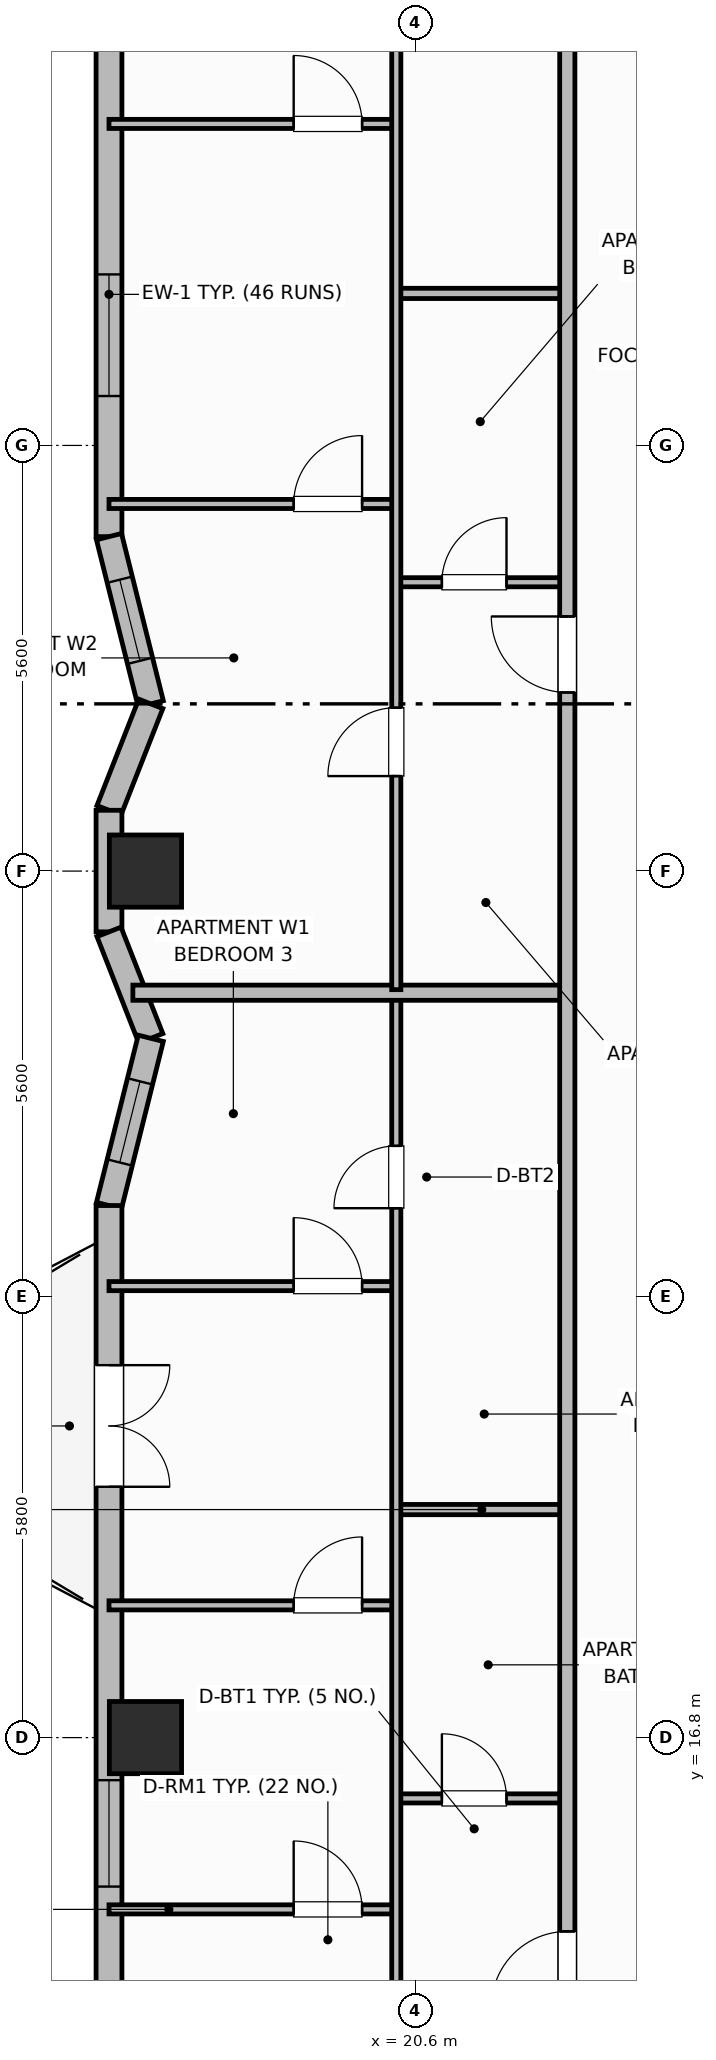
"""IFC4 building model, lengths in metres.
Left out: names, types, materials, properties, quantities, classifications, styles, units other than length and angle.
Written with IfcOpenShell. Run it as: python <this file> out.ifc"""

import sys

from ifc_helpers import new_model, si_unit, direction, frame, frame_2d, origin, origin_2d, place, context, subcontext, project, spatial, rectangle, extrude, element, fill, save


model = new_model("IFC4")
c1 = context("Model", 3, precision=1e-05, world=origin(), true_north=direction((0.0, 1.0)))
c2 = subcontext(c1, "Body", "Model", "MODEL_VIEW")
j1 = project(units=[si_unit("LENGTHUNIT", "METRE"), si_unit("PLANEANGLEUNIT", "RADIAN")], contexts=[c1])
p1 = place(None, origin())
s1 = spatial("IfcSite", under=j1, at=p1, CompositionType="ELEMENT")
p2 = place(p1, origin())
s2 = spatial("IfcBuilding", under=s1, at=p2, CompositionType="ELEMENT")
p3 = place(p2, frame((0.0, 0.0, 151.5)))
s3 = spatial("IfcBuildingStorey", under=s2, at=p3, CompositionType="ELEMENT", Elevation=151.5)
for number, where, z_axis, x_axis in (
    (1, (17.05, 16.8, 0.0), (0.0, 0.0, 1.0), (1.0, 0.0, 0.0)),
    (2, (17.05, 28.2, 0.0), (0.0, 0.0, 1.0), (1.0, 0.0, 0.0)),
):
    element("IfcColumn", number, at=place(p3, frame(where, z_axis=z_axis, x_axis=x_axis)), inside=s3, PredefinedType="COLUMN", context=c2, shape_type="SweptSolid", body=[
        extrude(rectangle(XDim=0.95, YDim=0.95, at=origin_2d()), origin(), (0.0, 0.0, 1.0), 3.7),
    ])
p4 = place(p3, frame((16.57, 45.9, 0.0), z_axis=(0.0, 0.0, 1.0), x_axis=(0.0, -1.0, 0.0)))
e3 = element("IfcWall", 3, at=p4, inside=s3, PredefinedType="SOLIDWALL", context=c2, shape_type="SweptSolid", body=[
    extrude(rectangle(XDim=13.3, YDim=0.34, at=frame_2d((6.65, 0.0))), origin(), (0.0, 0.0, 1.0), 2.72),
])
p5 = place(p4, frame((1.85, 0.0, 0.7)))
e4 = element("IfcOpeningElement", 4, at=p5, cuts=e3, PredefinedType="OPENING", context=c2, shape_type="SweptSolid", body=[
    extrude(rectangle(XDim=1.6, YDim=1.9, at=frame_2d((0.8, 0.95))), frame((0.0, 0.18, 0.0), z_axis=(0.0, -1.0, 0.0), x_axis=(1.0, 0.0, 0.0)), (0.0, 0.0, 1.0), 0.36),
])
p6 = place(p4, frame((9.85, 0.0, 0.7)))
e5 = element("IfcOpeningElement", 5, at=p6, cuts=e3, PredefinedType="OPENING", context=c2, shape_type="SweptSolid", body=[
    extrude(rectangle(XDim=1.6, YDim=1.9, at=frame_2d((0.8, 0.95))), frame((0.0, 0.18, 0.0), z_axis=(0.0, -1.0, 0.0), x_axis=(1.0, 0.0, 0.0)), (0.0, 0.0, 1.0), 0.36),
])
p7 = place(p3, frame((16.57, 32.6, 0.0), z_axis=(0.0, 0.0, 1.0), x_axis=(0.242535625036, -0.970142500145, 0.0)))
e6 = element("IfcWall", 6, at=p7, inside=s3, PredefinedType="SOLIDWALL", context=c2, shape_type="SweptSolid", body=[
    extrude(rectangle(XDim=2.268, YDim=0.34, at=frame_2d((1.134, 0.0))), origin(), (0.0, 0.0, 1.0), 2.72),
])
p8 = place(p7, frame((0.584, 0.0, 0.91)))
e7 = element("IfcOpeningElement", 7, at=p8, cuts=e6, PredefinedType="OPENING", context=c2, shape_type="SweptSolid", body=[
    extrude(rectangle(XDim=1.1, YDim=1.65, at=frame_2d((0.55, 0.825))), frame((0.0, 0.18, 0.0), z_axis=(0.0, -1.0, 0.0), x_axis=(1.0, 0.0, 0.0)), (0.0, 0.0, 1.0), 0.36),
])
p9 = place(p3, frame((17.12, 30.4, 0.0), z_axis=(0.0, 0.0, 1.0), x_axis=(-0.365702591843, -0.930731762818, 0.0)))
e8 = element("IfcWall", 8, at=p9, inside=s3, PredefinedType="SOLIDWALL", context=c2, shape_type="SweptSolid", body=[
    extrude(rectangle(XDim=1.504, YDim=0.34, at=frame_2d((0.752, 0.0))), origin(), (0.0, 0.0, 1.0), 2.72),
])
p10 = place(p3, frame((16.57, 29.0, 0.0), z_axis=(0.0, 0.0, 1.0), x_axis=(0.0, -1.0, 0.0)))
e9 = element("IfcWall", 9, at=p10, inside=s3, PredefinedType="SOLIDWALL", context=c2, shape_type="SweptSolid", body=[
    extrude(rectangle(XDim=1.6, YDim=0.34, at=frame_2d((0.8, 0.0))), origin(), (0.0, 0.0, 1.0), 2.72),
])
p11 = place(p3, frame((16.57, 27.4, 0.0), z_axis=(0.0, 0.0, 1.0), x_axis=(0.365702591843, -0.930731762818, 0.0)))
e10 = element("IfcWall", 10, at=p11, inside=s3, PredefinedType="SOLIDWALL", context=c2, shape_type="SweptSolid", body=[
    extrude(rectangle(XDim=1.504, YDim=0.34, at=frame_2d((0.752, 0.0))), origin(), (0.0, 0.0, 1.0), 2.72),
])
p12 = place(p3, frame((17.12, 26.0, 0.0), z_axis=(0.0, 0.0, 1.0), x_axis=(-0.242560957029, -0.970136166796, 0.0)))
e11 = element("IfcWall", 11, at=p12, inside=s3, PredefinedType="SOLIDWALL", context=c2, shape_type="SweptSolid", body=[
    extrude(rectangle(XDim=2.268, YDim=0.34, at=frame_2d((1.134, 0.0))), origin(), (0.0, 0.0, 1.0), 2.72),
])
p13 = place(p12, frame((0.584, 0.0, 0.91)))
e12 = element("IfcOpeningElement", 12, at=p13, cuts=e11, PredefinedType="OPENING", context=c2, shape_type="SweptSolid", body=[
    extrude(rectangle(XDim=1.1, YDim=1.65, at=frame_2d((0.55, 0.825))), frame((0.0, 0.18, 0.0), z_axis=(0.0, -1.0, 0.0), x_axis=(1.0, 0.0, 0.0)), (0.0, 0.0, 1.0), 0.36),
])
p14 = place(p3, frame((16.57, 23.8, 0.0), z_axis=(0.0, 0.0, 1.0), x_axis=(0.0, -1.0, 0.0)))
e13 = element("IfcWall", 13, at=p14, inside=s3, PredefinedType="SOLIDWALL", context=c2, shape_type="SweptSolid", body=[
    extrude(rectangle(XDim=13.3, YDim=0.34, at=frame_2d((6.65, 0.0))), origin(), (0.0, 0.0, 1.0), 2.72),
])
p15 = place(p14, frame((2.1, 0.0, 0.0)))
e14 = element("IfcOpeningElement", 14, at=p15, cuts=e13, PredefinedType="OPENING", context=c2, shape_type="SweptSolid", body=[
    extrude(rectangle(XDim=1.6, YDim=2.1, at=frame_2d((0.8, 1.05))), frame((0.0, 0.18, 0.0), z_axis=(0.0, -1.0, 0.0), x_axis=(1.0, 0.0, 0.0)), (0.0, 0.0, 1.0), 0.36),
])
p16 = place(p14, frame((7.56, 0.0, 0.71)))
e15 = element("IfcOpeningElement", 15, at=p16, cuts=e13, PredefinedType="OPENING", context=c2, shape_type="SweptSolid", body=[
    extrude(rectangle(XDim=1.4, YDim=1.85, at=frame_2d((0.7, 0.925))), frame((0.0, 0.18, 0.0), z_axis=(0.0, -1.0, 0.0), x_axis=(1.0, 0.0, 0.0)), (0.0, 0.0, 1.0), 0.36),
])
p17 = place(p14, frame((10.45, 0.0, 0.75)))
e16 = element("IfcOpeningElement", 16, at=p17, cuts=e13, PredefinedType="OPENING", context=c2, shape_type="SweptSolid", body=[
    extrude(rectangle(XDim=1.4, YDim=1.85, at=frame_2d((0.7, 0.925))), frame((0.0, 0.18, 0.0), z_axis=(0.0, -1.0, 0.0), x_axis=(1.0, 0.0, 0.0)), (0.0, 0.0, 1.0), 0.36),
])
p18 = place(p3, frame((20.35, 16.0, 0.0), z_axis=(0.0, 0.0, 1.0), x_axis=(1.0, 0.0, 0.0)))
e17 = element("IfcWall", 17, at=p18, inside=s3, PredefinedType="PARTITIONING", context=c2, shape_type="SweptSolid", body=[
    extrude(rectangle(XDim=2.25, YDim=0.12, at=frame_2d((1.125, 0.0))), origin(), (0.0, 0.0, 1.0), 2.55),
])
p19 = place(p18, frame((0.6, 0.0, 0.0)))
e18 = element("IfcOpeningElement", 18, at=p19, cuts=e17, PredefinedType="OPENING", context=c2, shape_type="SweptSolid", body=[
    extrude(rectangle(XDim=0.85, YDim=2.1, at=frame_2d((0.425, 1.05))), frame((0.0, 0.07, 0.0), z_axis=(0.0, -1.0, 0.0), x_axis=(1.0, 0.0, 0.0)), (0.0, 0.0, 1.0), 0.14),
])
p20 = place(p3, frame((20.35, 19.8, 0.0), z_axis=(0.0, 0.0, 1.0), x_axis=(1.0, 0.0, 0.0)))
e19 = element("IfcWall", 19, at=p20, inside=s3, PredefinedType="PARTITIONING", context=c2, shape_type="SweptSolid", body=[
    extrude(rectangle(XDim=2.25, YDim=0.135, at=frame_2d((1.125, 0.0))), origin(), (0.0, 0.0, 1.0), 2.55),
])
p21 = place(p3, frame((16.57, 14.54, 0.0), z_axis=(0.0, 0.0, 1.0), x_axis=(1.0, 0.0, 0.0)))
e20 = element("IfcWall", 20, at=p21, inside=s3, PredefinedType="PARTITIONING", context=c2, shape_type="SweptSolid", body=[
    extrude(rectangle(XDim=3.78, YDim=0.12, at=frame_2d((1.89, 0.0))), origin(), (0.0, 0.0, 1.0), 2.55),
])
p22 = place(p21, frame((2.43, 0.0, 0.0)))
e21 = element("IfcOpeningElement", 21, at=p22, cuts=e20, PredefinedType="OPENING", context=c2, shape_type="SweptSolid", body=[
    extrude(rectangle(XDim=0.9, YDim=2.1, at=frame_2d((0.45, 1.05))), frame((0.0, 0.07, 0.0), z_axis=(0.0, -1.0, 0.0), x_axis=(1.0, 0.0, 0.0)), (0.0, 0.0, 1.0), 0.14),
])
p23 = place(p3, frame((16.57, 18.54, 0.0), z_axis=(0.0, 0.0, 1.0), x_axis=(1.0, 0.0, 0.0)))
e22 = element("IfcWall", 22, at=p23, inside=s3, PredefinedType="PARTITIONING", context=c2, shape_type="SweptSolid", body=[
    extrude(rectangle(XDim=3.78, YDim=0.12, at=frame_2d((1.89, 0.0))), origin(), (0.0, 0.0, 1.0), 2.55),
])
p24 = place(p23, frame((2.43, 0.0, 0.0)))
e23 = element("IfcOpeningElement", 23, at=p24, cuts=e22, PredefinedType="OPENING", context=c2, shape_type="SweptSolid", body=[
    extrude(rectangle(XDim=0.9, YDim=2.1, at=frame_2d((0.45, 1.05))), frame((0.0, 0.07, 0.0), z_axis=(0.0, -1.0, 0.0), x_axis=(1.0, 0.0, 0.0)), (0.0, 0.0, 1.0), 0.14),
])
p25 = place(p3, frame((16.57, 22.74, 0.0), z_axis=(0.0, 0.0, 1.0), x_axis=(1.0, 0.0, 0.0)))
e24 = element("IfcWall", 24, at=p25, inside=s3, PredefinedType="PARTITIONING", context=c2, shape_type="SweptSolid", body=[
    extrude(rectangle(XDim=3.78, YDim=0.12, at=frame_2d((1.89, 0.0))), origin(), (0.0, 0.0, 1.0), 2.55),
])
p26 = place(p25, frame((2.43, 0.0, 0.0)))
e25 = element("IfcOpeningElement", 25, at=p26, cuts=e24, PredefinedType="OPENING", context=c2, shape_type="SweptSolid", body=[
    extrude(rectangle(XDim=0.9, YDim=2.1, at=frame_2d((0.45, 1.05))), frame((0.0, 0.07, 0.0), z_axis=(0.0, -1.0, 0.0), x_axis=(1.0, 0.0, 0.0)), (0.0, 0.0, 1.0), 0.14),
])
p27 = place(p3, frame((20.35, 10.64, 0.0), z_axis=(0.0, 0.0, 1.0), x_axis=(0.0, 1.0, 0.0)))
e26 = element("IfcWall", 26, at=p27, inside=s3, PredefinedType="PARTITIONING", context=c2, shape_type="SweptSolid", body=[
    extrude(rectangle(XDim=15.92, YDim=0.12, at=frame_2d((7.96, 0.0))), origin(), (0.0, 0.0, 1.0), 2.55),
])
p28 = place(p27, frame((0.41, 0.0, 0.0)))
e27 = element("IfcOpeningElement", 27, at=p28, cuts=e26, PredefinedType="OPENING", context=c2, shape_type="SweptSolid", body=[
    extrude(rectangle(XDim=0.9, YDim=2.1, at=frame_2d((0.45, 1.05))), frame((0.0, 0.07, 0.0), z_axis=(0.0, -1.0, 0.0), x_axis=(1.0, 0.0, 0.0)), (0.0, 0.0, 1.0), 0.14),
])
p29 = place(p27, frame((13.125, 0.0, 0.0)))
e28 = element("IfcOpeningElement", 28, at=p29, cuts=e26, PredefinedType="OPENING", context=c2, shape_type="SweptSolid", body=[
    extrude(rectangle(XDim=0.82, YDim=2.08, at=frame_2d((0.41, 1.04))), frame((0.0, 0.07, 0.0), z_axis=(0.0, -1.0, 0.0), x_axis=(1.0, 0.0, 0.0)), (0.0, 0.0, 1.0), 0.14),
])
p30 = place(p3, frame((16.884, 26.6, 0.0), z_axis=(0.0, 0.0, 1.0), x_axis=(1.0, 0.0, 0.0)))
e29 = element("IfcWall", 29, at=p30, inside=s3, PredefinedType="PARTITIONING", context=c2, shape_type="SweptSolid", body=[
    extrude(rectangle(XDim=5.716, YDim=0.2, at=frame_2d((2.858, 0.0))), origin(), (0.0, 0.0, 1.0), 2.55),
])
p31 = place(p3, frame((20.35, 32.0, 0.0), z_axis=(0.0, 0.0, 1.0), x_axis=(1.0, 0.0, 0.0)))
e30 = element("IfcWall", 30, at=p31, inside=s3, PredefinedType="PARTITIONING", context=c2, shape_type="SweptSolid", body=[
    extrude(rectangle(XDim=2.25, YDim=0.12, at=frame_2d((1.125, 0.0))), origin(), (0.0, 0.0, 1.0), 2.55),
])
p32 = place(p31, frame((0.6, 0.0, 0.0)))
e31 = element("IfcOpeningElement", 31, at=p32, cuts=e30, PredefinedType="OPENING", context=c2, shape_type="SweptSolid", body=[
    extrude(rectangle(XDim=0.85, YDim=2.1, at=frame_2d((0.425, 1.05))), frame((0.0, 0.07, 0.0), z_axis=(0.0, -1.0, 0.0), x_axis=(1.0, 0.0, 0.0)), (0.0, 0.0, 1.0), 0.14),
])
p33 = place(p3, frame((20.35, 35.8, 0.0), z_axis=(0.0, 0.0, 1.0), x_axis=(1.0, 0.0, 0.0)))
e32 = element("IfcWall", 32, at=p33, inside=s3, PredefinedType="PARTITIONING", context=c2, shape_type="SweptSolid", body=[
    extrude(rectangle(XDim=2.25, YDim=0.135, at=frame_2d((1.125, 0.0))), origin(), (0.0, 0.0, 1.0), 2.55),
])
p34 = place(p3, frame((16.57, 33.03, 0.0), z_axis=(0.0, 0.0, 1.0), x_axis=(1.0, 0.0, 0.0)))
e33 = element("IfcWall", 33, at=p34, inside=s3, PredefinedType="PARTITIONING", context=c2, shape_type="SweptSolid", body=[
    extrude(rectangle(XDim=3.78, YDim=0.12, at=frame_2d((1.89, 0.0))), origin(), (0.0, 0.0, 1.0), 2.55),
])
p35 = place(p34, frame((2.43, 0.0, 0.0)))
e34 = element("IfcOpeningElement", 34, at=p35, cuts=e33, PredefinedType="OPENING", context=c2, shape_type="SweptSolid", body=[
    extrude(rectangle(XDim=0.9, YDim=2.1, at=frame_2d((0.45, 1.05))), frame((0.0, 0.07, 0.0), z_axis=(0.0, -1.0, 0.0), x_axis=(1.0, 0.0, 0.0)), (0.0, 0.0, 1.0), 0.14),
])
p36 = place(p3, frame((16.57, 38.03, 0.0), z_axis=(0.0, 0.0, 1.0), x_axis=(1.0, 0.0, 0.0)))
e35 = element("IfcWall", 35, at=p36, inside=s3, PredefinedType="PARTITIONING", context=c2, shape_type="SweptSolid", body=[
    extrude(rectangle(XDim=3.78, YDim=0.12, at=frame_2d((1.89, 0.0))), origin(), (0.0, 0.0, 1.0), 2.55),
])
p37 = place(p36, frame((2.43, 0.0, 0.0)))
e36 = element("IfcOpeningElement", 36, at=p37, cuts=e35, PredefinedType="OPENING", context=c2, shape_type="SweptSolid", body=[
    extrude(rectangle(XDim=0.9, YDim=2.1, at=frame_2d((0.45, 1.05))), frame((0.0, 0.07, 0.0), z_axis=(0.0, -1.0, 0.0), x_axis=(1.0, 0.0, 0.0)), (0.0, 0.0, 1.0), 0.14),
])
p38 = place(p3, frame((20.35, 26.64, 0.0), z_axis=(0.0, 0.0, 1.0), x_axis=(0.0, 1.0, 0.0)))
e37 = element("IfcWall", 37, at=p38, inside=s3, PredefinedType="PARTITIONING", context=c2, shape_type="SweptSolid", body=[
    extrude(rectangle(XDim=19.12, YDim=0.12, at=frame_2d((9.56, 0.0))), origin(), (0.0, 0.0, 1.0), 2.55),
])
p39 = place(p38, frame((2.81, 0.0, 0.0)))
e38 = element("IfcOpeningElement", 38, at=p39, cuts=e37, PredefinedType="OPENING", context=c2, shape_type="SweptSolid", body=[
    extrude(rectangle(XDim=0.9, YDim=2.1, at=frame_2d((0.45, 1.05))), frame((0.0, 0.07, 0.0), z_axis=(0.0, -1.0, 0.0), x_axis=(1.0, 0.0, 0.0)), (0.0, 0.0, 1.0), 0.14),
])
p40 = place(p38, frame((15.365, 0.0, 0.0)))
e39 = element("IfcOpeningElement", 39, at=p40, cuts=e37, PredefinedType="OPENING", context=c2, shape_type="SweptSolid", body=[
    extrude(rectangle(XDim=0.82, YDim=2.08, at=frame_2d((0.41, 1.04))), frame((0.0, 0.07, 0.0), z_axis=(0.0, -1.0, 0.0), x_axis=(1.0, 0.0, 0.0)), (0.0, 0.0, 1.0), 0.14),
])
p41 = place(p3, frame((22.6, 10.6, 0.0), z_axis=(0.0, 0.0, 1.0), x_axis=(0.0, 1.0, 0.0)))
e40 = element("IfcWall", 40, at=p41, inside=s3, PredefinedType="PARTITIONING", context=c2, shape_type="SweptSolid", body=[
    extrude(rectangle(XDim=35.2, YDim=0.2, at=frame_2d((17.6, 0.0))), origin(), (0.0, 0.0, 1.0), 2.55),
])
p42 = place(p41, frame((2.65, 0.0, 0.0)))
e41 = element("IfcOpeningElement", 41, at=p42, cuts=e40, PredefinedType="OPENING", context=c2, shape_type="SweptSolid", body=[
    extrude(rectangle(XDim=1.0, YDim=2.15, at=frame_2d((0.5, 1.075))), frame((0.0, 0.11, 0.0), z_axis=(0.0, -1.0, 0.0), x_axis=(1.0, 0.0, 0.0)), (0.0, 0.0, 1.0), 0.22),
])
p43 = place(p41, frame((19.95, 0.0, 0.0)))
e42 = element("IfcOpeningElement", 42, at=p43, cuts=e40, PredefinedType="OPENING", context=c2, shape_type="SweptSolid", body=[
    extrude(rectangle(XDim=1.0, YDim=2.15, at=frame_2d((0.5, 1.075))), frame((0.0, 0.11, 0.0), z_axis=(0.0, -1.0, 0.0), x_axis=(1.0, 0.0, 0.0)), (0.0, 0.0, 1.0), 0.22),
])
p44 = place(p6, origin())
e43 = element("IfcWindow", 43, at=p44, inside=s3, PartitioningType="SINGLE_PANEL", PredefinedType="WINDOW", context=c2, shape_type="SweptSolid", body=[
    extrude(rectangle(XDim=1.6, YDim=1.9, at=frame_2d((0.8, 0.95))), frame((0.0, 0.03, 0.0), z_axis=(0.0, -1.0, 0.0), x_axis=(1.0, 0.0, 0.0)), (0.0, 0.0, 1.0), 0.06),
])
fill(e5, e43)
p45 = place(p8, origin())
e44 = element("IfcWindow", 44, at=p45, inside=s3, PartitioningType="SINGLE_PANEL", PredefinedType="WINDOW", context=c2, shape_type="SweptSolid", body=[
    extrude(rectangle(XDim=1.1, YDim=1.65, at=frame_2d((0.55, 0.825))), frame((0.0, 0.03, 0.0), z_axis=(0.0, -1.0, 0.0), x_axis=(1.0, 0.0, 0.0)), (0.0, 0.0, 1.0), 0.06),
])
fill(e7, e44)
p46 = place(p13, origin())
e45 = element("IfcWindow", 45, at=p46, inside=s3, PartitioningType="SINGLE_PANEL", PredefinedType="WINDOW", context=c2, shape_type="SweptSolid", body=[
    extrude(rectangle(XDim=1.1, YDim=1.65, at=frame_2d((0.55, 0.825))), frame((0.0, 0.03, 0.0), z_axis=(0.0, -1.0, 0.0), x_axis=(1.0, 0.0, 0.0)), (0.0, 0.0, 1.0), 0.06),
])
fill(e12, e45)
p47 = place(p15, origin())
e46 = element("IfcDoor", 46, at=p47, inside=s3, OperationType="DOUBLE_DOOR_SINGLE_SWING", PredefinedType="DOOR", context=c2, shape_type="SweptSolid", body=[
    extrude(rectangle(XDim=1.6, YDim=2.1, at=frame_2d((0.8, 1.05))), frame((0.0, 0.025, 0.0), z_axis=(0.0, -1.0, 0.0), x_axis=(1.0, 0.0, 0.0)), (0.0, 0.0, 1.0), 0.05),
])
fill(e14, e46)
p48 = place(p16, origin())
e47 = element("IfcWindow", 47, at=p48, inside=s3, PartitioningType="SINGLE_PANEL", PredefinedType="WINDOW", context=c2, shape_type="SweptSolid", body=[
    extrude(rectangle(XDim=1.4, YDim=1.85, at=frame_2d((0.7, 0.925))), frame((0.0, 0.03, 0.0), z_axis=(0.0, -1.0, 0.0), x_axis=(1.0, 0.0, 0.0)), (0.0, 0.0, 1.0), 0.06),
])
fill(e15, e47)
p49 = place(p19, origin())
e48 = element("IfcDoor", 48, at=p49, inside=s3, OperationType="SINGLE_SWING_LEFT", PredefinedType="DOOR", context=c2, shape_type="SweptSolid", body=[
    extrude(rectangle(XDim=0.85, YDim=2.1, at=frame_2d((0.425, 1.05))), frame((0.0, 0.025, 0.0), z_axis=(0.0, -1.0, 0.0), x_axis=(1.0, 0.0, 0.0)), (0.0, 0.0, 1.0), 0.05),
])
fill(e18, e48)
p50 = place(p22, origin())
e49 = element("IfcDoor", 49, at=p50, inside=s3, OperationType="SINGLE_SWING_LEFT", PredefinedType="DOOR", context=c2, shape_type="SweptSolid", body=[
    extrude(rectangle(XDim=0.9, YDim=2.1, at=frame_2d((0.45, 1.05))), frame((0.0, 0.025, 0.0), z_axis=(0.0, -1.0, 0.0), x_axis=(1.0, 0.0, 0.0)), (0.0, 0.0, 1.0), 0.05),
])
fill(e21, e49)
p51 = place(p24, origin())
e50 = element("IfcDoor", 50, at=p51, inside=s3, OperationType="SINGLE_SWING_RIGHT", PredefinedType="DOOR", context=c2, shape_type="SweptSolid", body=[
    extrude(rectangle(XDim=0.9, YDim=2.1, at=frame_2d((0.45, 1.05))), frame((0.0, 0.025, 0.0), z_axis=(0.0, -1.0, 0.0), x_axis=(1.0, 0.0, 0.0)), (0.0, 0.0, 1.0), 0.05),
])
fill(e23, e50)
p52 = place(p26, origin())
e51 = element("IfcDoor", 51, at=p52, inside=s3, OperationType="SINGLE_SWING_LEFT", PredefinedType="DOOR", context=c2, shape_type="SweptSolid", body=[
    extrude(rectangle(XDim=0.9, YDim=2.1, at=frame_2d((0.45, 1.05))), frame((0.0, 0.025, 0.0), z_axis=(0.0, -1.0, 0.0), x_axis=(1.0, 0.0, 0.0)), (0.0, 0.0, 1.0), 0.05),
])
fill(e25, e51)
p53 = place(p29, origin())
e52 = element("IfcDoor", 52, at=p53, inside=s3, OperationType="SINGLE_SWING_LEFT", PredefinedType="DOOR", context=c2, shape_type="SweptSolid", body=[
    extrude(rectangle(XDim=0.82, YDim=2.08, at=frame_2d((0.41, 1.04))), frame((0.0, 0.025, 0.0), z_axis=(0.0, -1.0, 0.0), x_axis=(1.0, 0.0, 0.0)), (0.0, 0.0, 1.0), 0.05),
])
fill(e28, e52)
p54 = place(p32, origin())
e53 = element("IfcDoor", 53, at=p54, inside=s3, OperationType="SINGLE_SWING_RIGHT", PredefinedType="DOOR", context=c2, shape_type="SweptSolid", body=[
    extrude(rectangle(XDim=0.85, YDim=2.1, at=frame_2d((0.425, 1.05))), frame((0.0, 0.025, 0.0), z_axis=(0.0, -1.0, 0.0), x_axis=(1.0, 0.0, 0.0)), (0.0, 0.0, 1.0), 0.05),
])
fill(e31, e53)
p55 = place(p35, origin())
e54 = element("IfcDoor", 54, at=p55, inside=s3, OperationType="SINGLE_SWING_RIGHT", PredefinedType="DOOR", context=c2, shape_type="SweptSolid", body=[
    extrude(rectangle(XDim=0.9, YDim=2.1, at=frame_2d((0.45, 1.05))), frame((0.0, 0.025, 0.0), z_axis=(0.0, -1.0, 0.0), x_axis=(1.0, 0.0, 0.0)), (0.0, 0.0, 1.0), 0.05),
])
fill(e34, e54)
p56 = place(p37, origin())
e55 = element("IfcDoor", 55, at=p56, inside=s3, OperationType="SINGLE_SWING_LEFT", PredefinedType="DOOR", context=c2, shape_type="SweptSolid", body=[
    extrude(rectangle(XDim=0.9, YDim=2.1, at=frame_2d((0.45, 1.05))), frame((0.0, 0.025, 0.0), z_axis=(0.0, -1.0, 0.0), x_axis=(1.0, 0.0, 0.0)), (0.0, 0.0, 1.0), 0.05),
])
fill(e36, e55)
p57 = place(p39, origin())
e56 = element("IfcDoor", 56, at=p57, inside=s3, OperationType="SINGLE_SWING_LEFT", PredefinedType="DOOR", context=c2, shape_type="SweptSolid", body=[
    extrude(rectangle(XDim=0.9, YDim=2.1, at=frame_2d((0.45, 1.05))), frame((0.0, 0.025, 0.0), z_axis=(0.0, -1.0, 0.0), x_axis=(1.0, 0.0, 0.0)), (0.0, 0.0, 1.0), 0.05),
])
fill(e38, e56)
p58 = place(p42, origin())
e57 = element("IfcDoor", 57, at=p58, inside=s3, OperationType="SINGLE_SWING_LEFT", PredefinedType="DOOR", context=c2, shape_type="SweptSolid", body=[
    extrude(rectangle(XDim=1.0, YDim=2.15, at=frame_2d((0.5, 1.075))), frame((0.0, 0.025, 0.0), z_axis=(0.0, -1.0, 0.0), x_axis=(1.0, 0.0, 0.0)), (0.0, 0.0, 1.0), 0.05),
])
fill(e41, e57)
p59 = place(p43, origin())
e58 = element("IfcDoor", 58, at=p59, inside=s3, OperationType="SINGLE_SWING_RIGHT", PredefinedType="DOOR", context=c2, shape_type="SweptSolid", body=[
    extrude(rectangle(XDim=1.0, YDim=2.15, at=frame_2d((0.5, 1.075))), frame((0.0, 0.025, 0.0), z_axis=(0.0, -1.0, 0.0), x_axis=(1.0, 0.0, 0.0)), (0.0, 0.0, 1.0), 0.05),
])
fill(e42, e58)
save(model, sys.argv[1])
